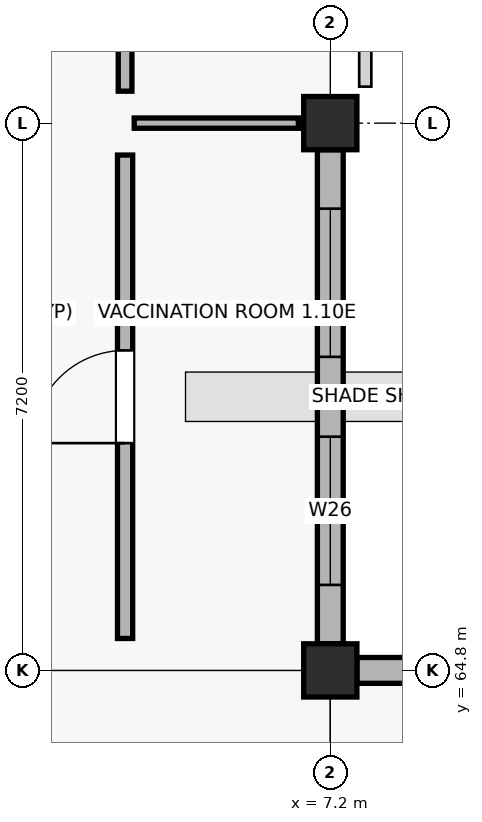
"""IFC4 building model, lengths in metres.
Left out: names, types, materials, properties, quantities, classifications, styles, units other than length and angle.
Written with IfcOpenShell. Run it as: python <this file> out.ifc"""

import sys

from ifc_helpers import new_model, si_unit, direction, frame, frame_2d, origin, origin_2d, place, context, subcontext, project, spatial, rectangle, extrude, element, fill, save


model = new_model("IFC4")
c1 = context("Model", 3, precision=1e-05, world=origin(), true_north=direction((0.0, 1.0)))
c2 = subcontext(c1, "Body", "Model", "MODEL_VIEW")
j1 = project(units=[si_unit("LENGTHUNIT", "METRE"), si_unit("PLANEANGLEUNIT", "RADIAN")], contexts=[c1])
p1 = place(None, origin())
s1 = spatial("IfcSite", under=j1, at=p1, CompositionType="ELEMENT")
p2 = place(p1, origin())
s2 = spatial("IfcBuilding", under=s1, at=p2, CompositionType="ELEMENT")
p3 = place(p2, origin())
s3 = spatial("IfcBuildingStorey", under=s2, at=p3, CompositionType="ELEMENT", Elevation=0.0)
for number, where, z_axis, x_axis in (
    (1, (7.2, 64.8, -0.25), (0.0, 0.0, 1.0), (1.0, 0.0, 0.0)),
    (2, (7.2, 72.0, -0.25), (0.0, 0.0, 1.0), (1.0, 0.0, 0.0)),
):
    element("IfcColumn", number, at=place(p3, frame(where, z_axis=z_axis, x_axis=x_axis)), inside=s3, PredefinedType="COLUMN", context=c2, shape_type="SweptSolid", body=[
        extrude(rectangle(XDim=0.7, YDim=0.7, at=origin_2d()), origin(), (0.0, 0.0, 1.0), 4.75),
    ])
p4 = place(p3, frame((7.2, 65.15, 0.0), z_axis=(0.0, 0.0, 1.0), x_axis=(0.0, 1.0, 0.0)))
e3 = element("IfcWall", 3, at=p4, inside=s3, PredefinedType="SOLIDWALL", context=c2, shape_type="SweptSolid", body=[
    extrude(rectangle(XDim=6.5, YDim=0.34, at=frame_2d((3.25, 0.0))), origin(), (0.0, 0.0, 1.0), 3.52),
])
p5 = place(p4, frame((0.775, 0.0, 0.9)))
e4 = element("IfcOpeningElement", 4, at=p5, cuts=e3, PredefinedType="OPENING", context=c2, shape_type="SweptSolid", body=[
    extrude(rectangle(XDim=1.95, YDim=1.5, at=frame_2d((0.975, 0.75))), frame((0.0, 0.18, 0.0), z_axis=(0.0, -1.0, 0.0), x_axis=(1.0, 0.0, 0.0)), (0.0, 0.0, 1.0), 0.36),
])
p6 = place(p4, frame((3.775, 0.0, 0.9)))
e5 = element("IfcOpeningElement", 5, at=p6, cuts=e3, PredefinedType="OPENING", context=c2, shape_type="SweptSolid", body=[
    extrude(rectangle(XDim=1.95, YDim=1.5, at=frame_2d((0.975, 0.75))), frame((0.0, 0.18, 0.0), z_axis=(0.0, -1.0, 0.0), x_axis=(1.0, 0.0, 0.0)), (0.0, 0.0, 1.0), 0.36),
])
p7 = place(p3, frame((14.075, 64.8, 0.0), z_axis=(0.0, 0.0, 1.0), x_axis=(-1.0, 0.0, 0.0)))
e6 = element("IfcWall", 6, at=p7, inside=s3, PredefinedType="SOLIDWALL", context=c2, shape_type="SweptSolid", body=[
    extrude(rectangle(XDim=6.525, YDim=0.34, at=frame_2d((3.262, 0.0))), origin(), (0.0, 0.0, 1.0), 3.47),
])
p8 = place(p7, frame((1.3, 0.0, 0.9)))
e7 = element("IfcOpeningElement", 7, at=p8, cuts=e6, PredefinedType="OPENING", context=c2, shape_type="SweptSolid", body=[
    extrude(rectangle(XDim=0.9, YDim=1.88, at=frame_2d((0.45, 0.94))), frame((0.0, 0.18, 0.0), z_axis=(0.0, -1.0, 0.0), x_axis=(1.0, 0.0, 0.0)), (0.0, 0.0, 1.0), 0.36),
])
p9 = place(p7, frame((4.325, 0.0, 0.9)))
e8 = element("IfcOpeningElement", 8, at=p9, cuts=e6, PredefinedType="OPENING", context=c2, shape_type="SweptSolid", body=[
    extrude(rectangle(XDim=0.9, YDim=1.88, at=frame_2d((0.45, 0.94))), frame((0.0, 0.18, 0.0), z_axis=(0.0, -1.0, 0.0), x_axis=(1.0, 0.0, 0.0)), (0.0, 0.0, 1.0), 0.36),
])
p10 = place(p3, frame((4.5, 65.22, 0.0), z_axis=(0.0, 0.0, 1.0), x_axis=(0.0, 1.0, 0.0)))
e9 = element("IfcWall", 9, at=p10, inside=s3, PredefinedType="SOLIDWALL", context=c2, shape_type="SweptSolid", body=[
    extrude(rectangle(XDim=6.36, YDim=0.2, at=frame_2d((3.18, 0.0))), origin(), (0.0, 0.0, 1.0), 3.36),
])
p11 = place(p10, frame((2.57, 0.0, 0.0)))
e10 = element("IfcOpeningElement", 10, at=p11, cuts=e9, PredefinedType="OPENING", context=c2, shape_type="SweptSolid", body=[
    extrude(rectangle(XDim=1.22, YDim=2.04, at=frame_2d((0.61, 1.02))), frame((0.0, 0.11, 0.0), z_axis=(0.0, -1.0, 0.0), x_axis=(1.0, 0.0, 0.0)), (0.0, 0.0, 1.0), 0.22),
])
p12 = place(p3, frame((4.62, 72.0, 0.0), z_axis=(0.0, 0.0, 1.0), x_axis=(1.0, 0.0, 0.0)))
e11 = element("IfcWall", 11, at=p12, inside=s3, PredefinedType="PARTITIONING", context=c2, shape_type="SweptSolid", body=[
    extrude(rectangle(XDim=2.16, YDim=0.135, at=frame_2d((1.08, 0.0))), origin(), (0.0, 0.0, 1.0), 3.36),
])
p13 = place(p3, frame((4.5, 72.42, 0.0), z_axis=(0.0, 0.0, 1.0), x_axis=(0.0, 1.0, 0.0)))
e12 = element("IfcWall", 12, at=p13, inside=s3, PredefinedType="PARTITIONING", context=c2, shape_type="SweptSolid", body=[
    extrude(rectangle(XDim=6.36, YDim=0.18, at=frame_2d((3.18, 0.0))), origin(), (0.0, 0.0, 1.0), 3.36),
])
p14 = place(p13, frame((2.53, 0.0, 0.0)))
e13 = element("IfcOpeningElement", 13, at=p14, cuts=e12, PredefinedType="OPENING", context=c2, shape_type="SweptSolid", body=[
    extrude(rectangle(XDim=1.3, YDim=2.04, at=frame_2d((0.65, 1.02))), frame((0.0, 0.1, 0.0), z_axis=(0.0, -1.0, 0.0), x_axis=(1.0, 0.0, 0.0)), (0.0, 0.0, 1.0), 0.2),
])
p15 = place(p5, origin())
e14 = element("IfcWindow", 14, at=p15, inside=s3, PartitioningType="SINGLE_PANEL", PredefinedType="WINDOW", context=c2, shape_type="SweptSolid", body=[
    extrude(rectangle(XDim=1.95, YDim=1.5, at=frame_2d((0.975, 0.75))), frame((0.0, 0.03, 0.0), z_axis=(0.0, -1.0, 0.0), x_axis=(1.0, 0.0, 0.0)), (0.0, 0.0, 1.0), 0.06),
])
fill(e4, e14)
p16 = place(p6, origin())
e15 = element("IfcWindow", 15, at=p16, inside=s3, PartitioningType="SINGLE_PANEL", PredefinedType="WINDOW", context=c2, shape_type="SweptSolid", body=[
    extrude(rectangle(XDim=1.95, YDim=1.5, at=frame_2d((0.975, 0.75))), frame((0.0, 0.03, 0.0), z_axis=(0.0, -1.0, 0.0), x_axis=(1.0, 0.0, 0.0)), (0.0, 0.0, 1.0), 0.06),
])
fill(e5, e15)
p17 = place(p11, origin())
e16 = element("IfcDoor", 16, at=p17, inside=s3, OperationType="SINGLE_SWING_LEFT", PredefinedType="DOOR", context=c2, shape_type="SweptSolid", body=[
    extrude(rectangle(XDim=1.22, YDim=2.04, at=frame_2d((0.61, 1.02))), frame((0.0, 0.025, 0.0), z_axis=(0.0, -1.0, 0.0), x_axis=(1.0, 0.0, 0.0)), (0.0, 0.0, 1.0), 0.05),
])
fill(e10, e16)
save(model, sys.argv[1])
